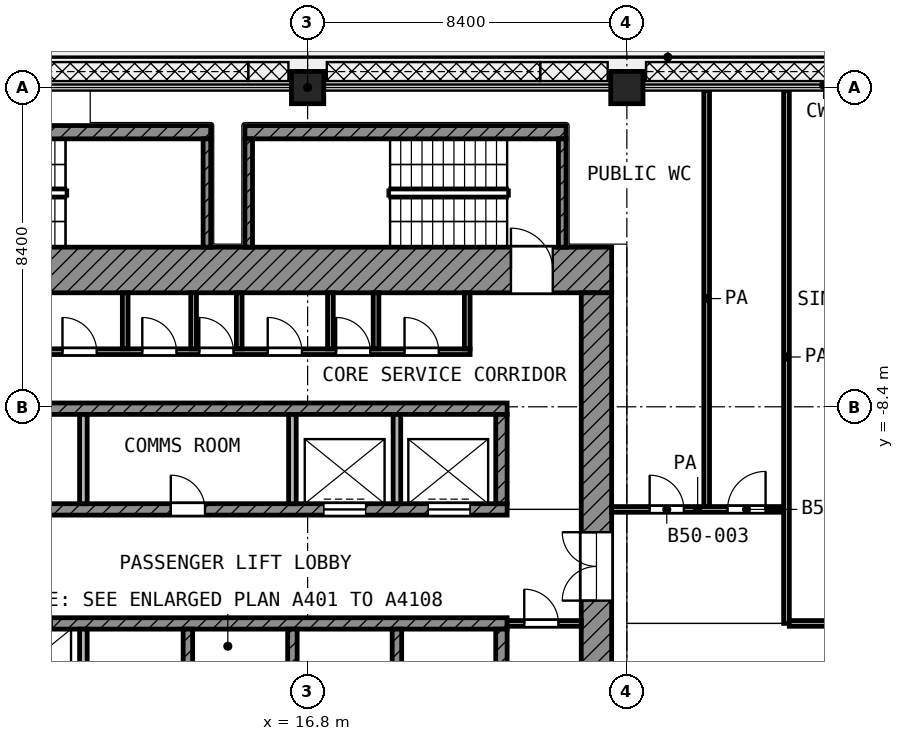
"""IFC4 building model, lengths in metres.
Left out: names, types, materials, properties, quantities, classifications, styles, units other than length and angle.
Written with IfcOpenShell. Run it as: python <this file> out.ifc"""

import sys

from ifc_helpers import new_model, si_unit, direction, frame, frame_2d, origin, origin_2d, place, context, subcontext, project, spatial, rectangle, extrude, element, fill, save


model = new_model("IFC4")
c1 = context("Model", 3, precision=1e-05, world=origin(), true_north=direction((0.0, 1.0)))
c2 = subcontext(c1, "Body", "Model", "MODEL_VIEW")
j1 = project(units=[si_unit("LENGTHUNIT", "METRE"), si_unit("PLANEANGLEUNIT", "RADIAN")], contexts=[c1])
p1 = place(None, origin())
s1 = spatial("IfcSite", under=j1, at=p1, CompositionType="ELEMENT")
p2 = place(p1, origin())
s2 = spatial("IfcBuilding", under=s1, at=p2, CompositionType="ELEMENT")
p3 = place(p2, frame((0.0, 0.0, 218.0)))
s3 = spatial("IfcBuildingStorey", under=s2, at=p3, CompositionType="ELEMENT", Elevation=218.0)
for number, where, z_axis, x_axis in (
    (1, (16.8, 0.0, 0.0), (0.0, 0.0, 1.0), (1.0, 0.0, 0.0)),
    (2, (25.2, 0.0, 0.0), (0.0, 0.0, 1.0), (1.0, 0.0, 0.0)),
):
    element("IfcColumn", number, at=place(p3, frame(where, z_axis=z_axis, x_axis=x_axis)), inside=s3, PredefinedType="COLUMN", context=c2, shape_type="SweptSolid", body=[
        extrude(rectangle(XDim=0.85, YDim=0.85, at=origin_2d()), origin(), (0.0, 0.0, 1.0), 4.2),
    ])
p4 = place(p3, frame((4.2, -4.8, 0.0), z_axis=(0.0, 0.0, 1.0), x_axis=(1.0, 0.0, 0.0)))
e3 = element("IfcWall", 3, at=p4, inside=s3, PredefinedType="SHEAR", context=c2, shape_type="SweptSolid", body=[
    extrude(rectangle(XDim=20.6, YDim=1.2, at=frame_2d((10.3, 0.0))), origin(), (0.0, 0.0, 1.0), 3.6),
])
p5 = place(p4, frame((1.95, 0.0, 0.0)))
e4 = element("IfcOpeningElement", 4, at=p5, cuts=e3, PredefinedType="OPENING", context=c2, shape_type="SweptSolid", body=[
    extrude(rectangle(XDim=1.1, YDim=2.1, at=frame_2d((0.55, 1.05))), frame((0.0, 0.61, 0.0), z_axis=(0.0, -1.0, 0.0), x_axis=(1.0, 0.0, 0.0)), (0.0, 0.0, 1.0), 1.22),
])
p6 = place(p4, frame((17.95, 0.0, 0.0)))
e5 = element("IfcOpeningElement", 5, at=p6, cuts=e3, PredefinedType="OPENING", context=c2, shape_type="SweptSolid", body=[
    extrude(rectangle(XDim=1.1, YDim=2.1, at=frame_2d((0.55, 1.05))), frame((0.0, 0.61, 0.0), z_axis=(0.0, -1.0, 0.0), x_axis=(1.0, 0.0, 0.0)), (0.0, 0.0, 1.0), 1.22),
])
p7 = place(p3, frame((24.4, -24.0, 0.0), z_axis=(0.0, 0.0, 1.0), x_axis=(0.0, 1.0, 0.0)))
e6 = element("IfcWall", 6, at=p7, inside=s3, PredefinedType="SHEAR", context=c2, shape_type="SweptSolid", body=[
    extrude(rectangle(XDim=18.6, YDim=0.8, at=frame_2d((9.3, 0.0))), origin(), (0.0, 0.0, 1.0), 3.6),
])
p8 = place(p7, frame((10.5, 0.0, 0.0)))
e7 = element("IfcOpeningElement", 7, at=p8, cuts=e6, PredefinedType="OPENING", context=c2, shape_type="SweptSolid", body=[
    extrude(rectangle(XDim=1.8, YDim=2.1, at=frame_2d((0.9, 1.05))), frame((0.0, 0.41, 0.0), z_axis=(0.0, -1.0, 0.0), x_axis=(1.0, 0.0, 0.0)), (0.0, 0.0, 1.0), 0.82),
])
p9 = place(p3, frame((5.4, -8.45, 0.0), z_axis=(0.0, 0.0, 1.0), x_axis=(1.0, 0.0, 0.0)))
e8 = element("IfcWall", 8, at=p9, inside=s3, PredefinedType="SHEAR", context=c2, shape_type="SweptSolid", body=[
    extrude(rectangle(XDim=16.65, YDim=0.3, at=frame_2d((8.325, 0.0))), origin(), (0.0, 0.0, 1.0), 3.6),
])
p10 = place(p3, frame((5.4, -11.1, 0.0), z_axis=(0.0, 0.0, 1.0), x_axis=(1.0, 0.0, 0.0)))
e9 = element("IfcWall", 9, at=p10, inside=s3, PredefinedType="SHEAR", context=c2, shape_type="SweptSolid", body=[
    extrude(rectangle(XDim=16.65, YDim=0.3, at=frame_2d((8.325, 0.0))), origin(), (0.0, 0.0, 1.0), 3.6),
])
p11 = place(p10, frame((11.825, 0.0, 0.0)))
e10 = element("IfcOpeningElement", 10, at=p11, cuts=e9, PredefinedType="OPENING", context=c2, shape_type="SweptSolid", body=[
    extrude(rectangle(XDim=1.1, YDim=2.1, at=frame_2d((0.55, 1.05))), frame((0.0, 0.16, 0.0), z_axis=(0.0, -1.0, 0.0), x_axis=(1.0, 0.0, 0.0)), (0.0, 0.0, 1.0), 0.32),
])
p12 = place(p10, frame((14.575, 0.0, 0.0)))
e11 = element("IfcOpeningElement", 11, at=p12, cuts=e9, PredefinedType="OPENING", context=c2, shape_type="SweptSolid", body=[
    extrude(rectangle(XDim=1.1, YDim=2.1, at=frame_2d((0.55, 1.05))), frame((0.0, 0.16, 0.0), z_axis=(0.0, -1.0, 0.0), x_axis=(1.0, 0.0, 0.0)), (0.0, 0.0, 1.0), 0.32),
])
p13 = place(p10, frame((2.3, 0.0, 0.0)))
e12 = element("IfcOpeningElement", 12, at=p13, cuts=e9, PredefinedType="OPENING", context=c2, shape_type="SweptSolid", body=[
    extrude(rectangle(XDim=0.9, YDim=2.1, at=frame_2d((0.45, 1.05))), frame((0.0, 0.16, 0.0), z_axis=(0.0, -1.0, 0.0), x_axis=(1.0, 0.0, 0.0)), (0.0, 0.0, 1.0), 0.32),
])
p14 = place(p10, frame((7.8, 0.0, 0.0)))
e13 = element("IfcOpeningElement", 13, at=p14, cuts=e9, PredefinedType="OPENING", context=c2, shape_type="SweptSolid", body=[
    extrude(rectangle(XDim=0.9, YDim=2.1, at=frame_2d((0.45, 1.05))), frame((0.0, 0.16, 0.0), z_axis=(0.0, -1.0, 0.0), x_axis=(1.0, 0.0, 0.0)), (0.0, 0.0, 1.0), 0.32),
])
p15 = place(p3, frame((5.4, -14.1, 0.0), z_axis=(0.0, 0.0, 1.0), x_axis=(1.0, 0.0, 0.0)))
e14 = element("IfcWall", 14, at=p15, inside=s3, PredefinedType="SHEAR", context=c2, shape_type="SweptSolid", body=[
    extrude(rectangle(XDim=16.65, YDim=0.3, at=frame_2d((8.325, 0.0))), origin(), (0.0, 0.0, 1.0), 3.6),
])
p16 = place(p15, frame((0.825, 0.0, 0.0)))
e15 = element("IfcOpeningElement", 15, at=p16, cuts=e14, PredefinedType="OPENING", context=c2, shape_type="SweptSolid", body=[
    extrude(rectangle(XDim=1.1, YDim=2.1, at=frame_2d((0.55, 1.05))), frame((0.0, 0.16, 0.0), z_axis=(0.0, -1.0, 0.0), x_axis=(1.0, 0.0, 0.0)), (0.0, 0.0, 1.0), 0.32),
])
p17 = place(p15, frame((3.575, 0.0, 0.0)))
e16 = element("IfcOpeningElement", 16, at=p17, cuts=e14, PredefinedType="OPENING", context=c2, shape_type="SweptSolid", body=[
    extrude(rectangle(XDim=1.1, YDim=2.1, at=frame_2d((0.55, 1.05))), frame((0.0, 0.16, 0.0), z_axis=(0.0, -1.0, 0.0), x_axis=(1.0, 0.0, 0.0)), (0.0, 0.0, 1.0), 0.32),
])
p18 = place(p3, frame((21.9, -10.95, 0.0), z_axis=(0.0, 0.0, 1.0), x_axis=(0.0, 1.0, 0.0)))
e17 = element("IfcWall", 17, at=p18, inside=s3, PredefinedType="SHEAR", context=c2, shape_type="SweptSolid", body=[
    extrude(rectangle(XDim=2.35, YDim=0.3, at=frame_2d((1.175, 0.0))), origin(), (0.0, 0.0, 1.0), 3.6),
])
p19 = place(p3, frame((21.9, -16.6, 0.0), z_axis=(0.0, 0.0, 1.0), x_axis=(0.0, 1.0, 0.0)))
e18 = element("IfcWall", 18, at=p19, inside=s3, PredefinedType="SHEAR", context=c2, shape_type="SweptSolid", body=[
    extrude(rectangle(XDim=2.35, YDim=0.3, at=frame_2d((1.175, 0.0))), origin(), (0.0, 0.0, 1.0), 3.6),
])
for number, where, z_axis, x_axis in (
    (19, (10.9, -10.95, 0.0), (0.0, 0.0, 1.0), (0.0, 1.0, 0.0)),
    (20, (16.4, -10.95, 0.0), (0.0, 0.0, 1.0), (0.0, 1.0, 0.0)),
    (21, (19.15, -10.95, 0.0), (0.0, 0.0, 1.0), (0.0, 1.0, 0.0)),
):
    element("IfcWall", number, at=place(p3, frame(where, z_axis=z_axis, x_axis=x_axis)), inside=s3, PredefinedType="PARTITIONING", context=c2, shape_type="SweptSolid", body=[
        extrude(rectangle(XDim=2.35, YDim=0.2, at=frame_2d((1.175, 0.0))), origin(), (0.0, 0.0, 1.0), 3.6),
    ])
p20 = place(p3, frame((10.9, -16.6, 0.0), z_axis=(0.0, 0.0, 1.0), x_axis=(0.0, 1.0, 0.0)))
e22 = element("IfcWall", 22, at=p20, inside=s3, PredefinedType="PARTITIONING", context=c2, shape_type="SweptSolid", body=[
    extrude(rectangle(XDim=2.35, YDim=0.2, at=frame_2d((1.175, 0.0))), origin(), (0.0, 0.0, 1.0), 3.6),
])
for number, where, z_axis, x_axis in (
    (23, (13.65, -16.6, 0.0), (0.0, 0.0, 1.0), (0.0, 1.0, 0.0)),
    (24, (16.4, -16.6, 0.0), (0.0, 0.0, 1.0), (0.0, 1.0, 0.0)),
    (25, (19.15, -16.6, 0.0), (0.0, 0.0, 1.0), (0.0, 1.0, 0.0)),
):
    element("IfcWall", number, at=place(p3, frame(where, z_axis=z_axis, x_axis=x_axis)), inside=s3, PredefinedType="SHEAR", context=c2, shape_type="SweptSolid", body=[
        extrude(rectangle(XDim=2.35, YDim=0.25, at=frame_2d((1.175, 0.0))), origin(), (0.0, 0.0, 1.0), 3.6),
    ])
p21 = place(p3, frame((22.05, -14.1, 0.0), z_axis=(0.0, 0.0, 1.0), x_axis=(1.0, 0.0, 0.0)))
e26 = element("IfcWall", 26, at=p21, inside=s3, PredefinedType="PARTITIONING", context=c2, shape_type="SweptSolid", body=[
    extrude(rectangle(XDim=1.95, YDim=0.15, at=frame_2d((0.975, 0.0))), origin(), (0.0, 0.0, 1.0), 3.6),
])
p22 = place(p21, frame((0.45, 0.0, 0.0)))
e27 = element("IfcOpeningElement", 27, at=p22, cuts=e26, PredefinedType="OPENING", context=c2, shape_type="SweptSolid", body=[
    extrude(rectangle(XDim=0.9, YDim=2.1, at=frame_2d((0.45, 1.05))), frame((0.0, 0.085, 0.0), z_axis=(0.0, -1.0, 0.0), x_axis=(1.0, 0.0, 0.0)), (0.0, 0.0, 1.0), 0.17),
])
p23 = place(p3, frame((8.325, -6.95, 0.0), z_axis=(0.0, 0.0, 1.0), x_axis=(1.0, 0.0, 0.0)))
e28 = element("IfcWall", 28, at=p23, inside=s3, PredefinedType="PARTITIONING", context=c2, shape_type="SweptSolid", body=[
    extrude(rectangle(XDim=12.75, YDim=0.15, at=frame_2d((6.375, 0.0))), origin(), (0.0, 0.0, 1.0), 3.6),
])
p24 = place(p23, frame((0.225, 0.0, 0.0)))
e29 = element("IfcOpeningElement", 29, at=p24, cuts=e28, PredefinedType="OPENING", context=c2, shape_type="SweptSolid", body=[
    extrude(rectangle(XDim=0.9, YDim=2.1, at=frame_2d((0.45, 1.05))), frame((0.0, 0.085, 0.0), z_axis=(0.0, -1.0, 0.0), x_axis=(1.0, 0.0, 0.0)), (0.0, 0.0, 1.0), 0.17),
])
p25 = place(p23, frame((2.025, 0.0, 0.0)))
e30 = element("IfcOpeningElement", 30, at=p25, cuts=e28, PredefinedType="OPENING", context=c2, shape_type="SweptSolid", body=[
    extrude(rectangle(XDim=0.9, YDim=2.1, at=frame_2d((0.45, 1.05))), frame((0.0, 0.085, 0.0), z_axis=(0.0, -1.0, 0.0), x_axis=(1.0, 0.0, 0.0)), (0.0, 0.0, 1.0), 0.17),
])
p26 = place(p23, frame((4.125, 0.0, 0.0)))
e31 = element("IfcOpeningElement", 31, at=p26, cuts=e28, PredefinedType="OPENING", context=c2, shape_type="SweptSolid", body=[
    extrude(rectangle(XDim=0.9, YDim=2.1, at=frame_2d((0.45, 1.05))), frame((0.0, 0.085, 0.0), z_axis=(0.0, -1.0, 0.0), x_axis=(1.0, 0.0, 0.0)), (0.0, 0.0, 1.0), 0.17),
])
p27 = place(p23, frame((5.625, 0.0, 0.0)))
e32 = element("IfcOpeningElement", 32, at=p27, cuts=e28, PredefinedType="OPENING", context=c2, shape_type="SweptSolid", body=[
    extrude(rectangle(XDim=0.9, YDim=2.1, at=frame_2d((0.45, 1.05))), frame((0.0, 0.085, 0.0), z_axis=(0.0, -1.0, 0.0), x_axis=(1.0, 0.0, 0.0)), (0.0, 0.0, 1.0), 0.17),
])
p28 = place(p23, frame((7.425, 0.0, 0.0)))
e33 = element("IfcOpeningElement", 33, at=p28, cuts=e28, PredefinedType="OPENING", context=c2, shape_type="SweptSolid", body=[
    extrude(rectangle(XDim=0.9, YDim=2.1, at=frame_2d((0.45, 1.05))), frame((0.0, 0.085, 0.0), z_axis=(0.0, -1.0, 0.0), x_axis=(1.0, 0.0, 0.0)), (0.0, 0.0, 1.0), 0.17),
])
p29 = place(p23, frame((9.225, 0.0, 0.0)))
e34 = element("IfcOpeningElement", 34, at=p29, cuts=e28, PredefinedType="OPENING", context=c2, shape_type="SweptSolid", body=[
    extrude(rectangle(XDim=0.9, YDim=2.1, at=frame_2d((0.45, 1.05))), frame((0.0, 0.085, 0.0), z_axis=(0.0, -1.0, 0.0), x_axis=(1.0, 0.0, 0.0)), (0.0, 0.0, 1.0), 0.17),
])
p30 = place(p23, frame((11.025, 0.0, 0.0)))
e35 = element("IfcOpeningElement", 35, at=p30, cuts=e28, PredefinedType="OPENING", context=c2, shape_type="SweptSolid", body=[
    extrude(rectangle(XDim=0.9, YDim=2.1, at=frame_2d((0.45, 1.05))), frame((0.0, 0.085, 0.0), z_axis=(0.0, -1.0, 0.0), x_axis=(1.0, 0.0, 0.0)), (0.0, 0.0, 1.0), 0.17),
])
for number, where, z_axis, x_axis in (
    (36, (12.0, -6.875, 0.0), (0.0, 0.0, 1.0), (0.0, 1.0, 0.0)),
    (37, (13.8, -6.875, 0.0), (0.0, 0.0, 1.0), (0.0, 1.0, 0.0)),
    (38, (15.0, -6.875, 0.0), (0.0, 0.0, 1.0), (0.0, 1.0, 0.0)),
    (39, (17.4, -6.875, 0.0), (0.0, 0.0, 1.0), (0.0, 1.0, 0.0)),
    (40, (18.6, -6.875, 0.0), (0.0, 0.0, 1.0), (0.0, 1.0, 0.0)),
    (41, (21.0, -6.875, 0.0), (0.0, 0.0, 1.0), (0.0, 1.0, 0.0)),
):
    element("IfcWall", number, at=place(p3, frame(where, z_axis=z_axis, x_axis=x_axis)), inside=s3, PredefinedType="PARTITIONING", context=c2, shape_type="SweptSolid", body=[
        extrude(rectangle(XDim=1.475, YDim=0.15, at=frame_2d((0.738, 0.0))), origin(), (0.0, 0.0, 1.0), 3.6),
    ])
p31 = place(p3, frame((5.8, -1.175, 0.0), z_axis=(0.0, 0.0, 1.0), x_axis=(1.0, 0.0, 0.0)))
e42 = element("IfcWall", 42, at=p31, inside=s3, PredefinedType="SHEAR", context=c2, shape_type="SweptSolid", body=[
    extrude(rectangle(XDim=8.45, YDim=0.35, at=frame_2d((4.225, 0.0))), origin(), (0.0, 0.0, 1.0), 3.6),
])
p32 = place(p3, frame((14.15, -4.2, 0.0), z_axis=(0.0, 0.0, 1.0), x_axis=(0.0, 1.0, 0.0)))
e43 = element("IfcWall", 43, at=p32, inside=s3, PredefinedType="SHEAR", context=c2, shape_type="SweptSolid", body=[
    extrude(rectangle(XDim=2.85, YDim=0.2, at=frame_2d((1.425, 0.0))), origin(), (0.0, 0.0, 1.0), 3.6),
])
p33 = place(p3, frame((15.15, -1.175, 0.0), z_axis=(0.0, 0.0, 1.0), x_axis=(1.0, 0.0, 0.0)))
e44 = element("IfcWall", 44, at=p33, inside=s3, PredefinedType="SHEAR", context=c2, shape_type="SweptSolid", body=[
    extrude(rectangle(XDim=8.45, YDim=0.35, at=frame_2d((4.225, 0.0))), origin(), (0.0, 0.0, 1.0), 3.6),
])
for number, where, z_axis, x_axis in (
    (45, (15.25, -4.2, 0.0), (0.0, 0.0, 1.0), (0.0, 1.0, 0.0)),
    (46, (23.5, -4.2, 0.0), (0.0, 0.0, 1.0), (0.0, 1.0, 0.0)),
):
    element("IfcWall", number, at=place(p3, frame(where, z_axis=z_axis, x_axis=x_axis)), inside=s3, PredefinedType="SHEAR", context=c2, shape_type="SweptSolid", body=[
        extrude(rectangle(XDim=2.85, YDim=0.2, at=frame_2d((1.425, 0.0))), origin(), (0.0, 0.0, 1.0), 3.6),
    ])
p34 = place(p3, frame((29.475, -14.1, 0.0), z_axis=(0.0, 0.0, 1.0), x_axis=(1.0, 0.0, 0.0)))
e47 = element("IfcWall", 47, at=p34, inside=s3, PredefinedType="PARTITIONING", context=c2, shape_type="SweptSolid", body=[
    extrude(rectangle(XDim=10.757, YDim=0.15, at=frame_2d((5.378, 0.0))), origin(), (0.0, 0.0, 1.0), 3.6),
])
p35 = place(p3, frame((24.8, -11.1, 0.0), z_axis=(0.0, 0.0, 1.0), x_axis=(1.0, 0.0, 0.0)))
e48 = element("IfcWall", 48, at=p35, inside=s3, PredefinedType="PARTITIONING", context=c2, shape_type="SweptSolid", body=[
    extrude(rectangle(XDim=4.525, YDim=0.15, at=frame_2d((2.262, 0.0))), origin(), (0.0, 0.0, 1.0), 3.6),
])
p36 = place(p35, frame((1.0, 0.0, 0.0)))
e49 = element("IfcOpeningElement", 49, at=p36, cuts=e48, PredefinedType="OPENING", context=c2, shape_type="SweptSolid", body=[
    extrude(rectangle(XDim=0.9, YDim=2.1, at=frame_2d((0.45, 1.05))), frame((0.0, 0.085, 0.0), z_axis=(0.0, -1.0, 0.0), x_axis=(1.0, 0.0, 0.0)), (0.0, 0.0, 1.0), 0.17),
])
p37 = place(p35, frame((3.05, 0.0, 0.0)))
e50 = element("IfcOpeningElement", 50, at=p37, cuts=e48, PredefinedType="OPENING", context=c2, shape_type="SweptSolid", body=[
    extrude(rectangle(XDim=1.0, YDim=2.1, at=frame_2d((0.5, 1.05))), frame((0.0, 0.085, 0.0), z_axis=(0.0, -1.0, 0.0), x_axis=(1.0, 0.0, 0.0)), (0.0, 0.0, 1.0), 0.17),
])
p38 = place(p3, frame((27.3, -11.025, 0.0), z_axis=(0.0, 0.0, 1.0), x_axis=(0.0, 1.0, 0.0)))
e51 = element("IfcWall", 51, at=p38, inside=s3, PredefinedType="PARTITIONING", context=c2, shape_type="SweptSolid", body=[
    extrude(rectangle(XDim=10.945, YDim=0.15, at=frame_2d((5.472, 0.0))), origin(), (0.0, 0.0, 1.0), 3.6),
])
p39 = place(p3, frame((29.4, -14.1, 0.0), z_axis=(0.0, 0.0, 1.0), x_axis=(0.0, 1.0, 0.0)))
e52 = element("IfcWall", 52, at=p39, inside=s3, PredefinedType="PARTITIONING", context=c2, shape_type="SweptSolid", body=[
    extrude(rectangle(XDim=14.02, YDim=0.15, at=frame_2d((7.01, 0.0))), origin(), (0.0, 0.0, 1.0), 3.6),
])
p40 = place(p11, origin())
e53 = element("IfcDoor", 53, at=p40, inside=s3, OperationType="DOUBLE_DOOR_SLIDING", PredefinedType="DOOR", context=c2, shape_type="SweptSolid", body=[
    extrude(rectangle(XDim=1.1, YDim=2.1, at=frame_2d((0.55, 1.05))), frame((0.0, 0.025, 0.0), z_axis=(0.0, -1.0, 0.0), x_axis=(1.0, 0.0, 0.0)), (0.0, 0.0, 1.0), 0.05),
])
fill(e10, e53)
p41 = place(p12, origin())
e54 = element("IfcDoor", 54, at=p41, inside=s3, OperationType="DOUBLE_DOOR_SLIDING", PredefinedType="DOOR", context=c2, shape_type="SweptSolid", body=[
    extrude(rectangle(XDim=1.1, YDim=2.1, at=frame_2d((0.55, 1.05))), frame((0.0, 0.025, 0.0), z_axis=(0.0, -1.0, 0.0), x_axis=(1.0, 0.0, 0.0)), (0.0, 0.0, 1.0), 0.05),
])
fill(e11, e54)
p42 = place(p6, origin())
e55 = element("IfcDoor", 55, at=p42, inside=s3, OperationType="SINGLE_SWING_LEFT", PredefinedType="DOOR", context=c2, shape_type="SweptSolid", body=[
    extrude(rectangle(XDim=1.1, YDim=2.1, at=frame_2d((0.55, 1.05))), frame((0.0, 0.025, 0.0), z_axis=(0.0, -1.0, 0.0), x_axis=(1.0, 0.0, 0.0)), (0.0, 0.0, 1.0), 0.05),
])
fill(e5, e55)
p43 = place(p8, origin())
e56 = element("IfcDoor", 56, at=p43, inside=s3, OperationType="DOUBLE_DOOR_SINGLE_SWING", PredefinedType="DOOR", context=c2, shape_type="SweptSolid", body=[
    extrude(rectangle(XDim=1.8, YDim=2.1, at=frame_2d((0.9, 1.05))), frame((0.0, 0.025, 0.0), z_axis=(0.0, -1.0, 0.0), x_axis=(1.0, 0.0, 0.0)), (0.0, 0.0, 1.0), 0.05),
])
fill(e7, e56)
p44 = place(p25, origin())
e57 = element("IfcDoor", 57, at=p44, inside=s3, OperationType="SINGLE_SWING_LEFT", PredefinedType="DOOR", context=c2, shape_type="SweptSolid", body=[
    extrude(rectangle(XDim=0.9, YDim=2.1, at=frame_2d((0.45, 1.05))), frame((0.0, 0.025, 0.0), z_axis=(0.0, -1.0, 0.0), x_axis=(1.0, 0.0, 0.0)), (0.0, 0.0, 1.0), 0.05),
])
fill(e30, e57)
p45 = place(p26, origin())
e58 = element("IfcDoor", 58, at=p45, inside=s3, OperationType="SINGLE_SWING_LEFT", PredefinedType="DOOR", context=c2, shape_type="SweptSolid", body=[
    extrude(rectangle(XDim=0.9, YDim=2.1, at=frame_2d((0.45, 1.05))), frame((0.0, 0.025, 0.0), z_axis=(0.0, -1.0, 0.0), x_axis=(1.0, 0.0, 0.0)), (0.0, 0.0, 1.0), 0.05),
])
fill(e31, e58)
p46 = place(p27, origin())
e59 = element("IfcDoor", 59, at=p46, inside=s3, OperationType="SINGLE_SWING_LEFT", PredefinedType="DOOR", context=c2, shape_type="SweptSolid", body=[
    extrude(rectangle(XDim=0.9, YDim=2.1, at=frame_2d((0.45, 1.05))), frame((0.0, 0.025, 0.0), z_axis=(0.0, -1.0, 0.0), x_axis=(1.0, 0.0, 0.0)), (0.0, 0.0, 1.0), 0.05),
])
fill(e32, e59)
p47 = place(p28, origin())
e60 = element("IfcDoor", 60, at=p47, inside=s3, OperationType="SINGLE_SWING_LEFT", PredefinedType="DOOR", context=c2, shape_type="SweptSolid", body=[
    extrude(rectangle(XDim=0.9, YDim=2.1, at=frame_2d((0.45, 1.05))), frame((0.0, 0.025, 0.0), z_axis=(0.0, -1.0, 0.0), x_axis=(1.0, 0.0, 0.0)), (0.0, 0.0, 1.0), 0.05),
])
fill(e33, e60)
p48 = place(p29, origin())
e61 = element("IfcDoor", 61, at=p48, inside=s3, OperationType="SINGLE_SWING_LEFT", PredefinedType="DOOR", context=c2, shape_type="SweptSolid", body=[
    extrude(rectangle(XDim=0.9, YDim=2.1, at=frame_2d((0.45, 1.05))), frame((0.0, 0.025, 0.0), z_axis=(0.0, -1.0, 0.0), x_axis=(1.0, 0.0, 0.0)), (0.0, 0.0, 1.0), 0.05),
])
fill(e34, e61)
p49 = place(p30, origin())
e62 = element("IfcDoor", 62, at=p49, inside=s3, OperationType="SINGLE_SWING_LEFT", PredefinedType="DOOR", context=c2, shape_type="SweptSolid", body=[
    extrude(rectangle(XDim=0.9, YDim=2.1, at=frame_2d((0.45, 1.05))), frame((0.0, 0.025, 0.0), z_axis=(0.0, -1.0, 0.0), x_axis=(1.0, 0.0, 0.0)), (0.0, 0.0, 1.0), 0.05),
])
fill(e35, e62)
p50 = place(p22, origin())
e63 = element("IfcDoor", 63, at=p50, inside=s3, OperationType="SINGLE_SWING_LEFT", PredefinedType="DOOR", context=c2, shape_type="SweptSolid", body=[
    extrude(rectangle(XDim=0.9, YDim=2.1, at=frame_2d((0.45, 1.05))), frame((0.0, 0.025, 0.0), z_axis=(0.0, -1.0, 0.0), x_axis=(1.0, 0.0, 0.0)), (0.0, 0.0, 1.0), 0.05),
])
fill(e27, e63)
p51 = place(p14, origin())
e64 = element("IfcDoor", 64, at=p51, inside=s3, OperationType="SINGLE_SWING_LEFT", PredefinedType="DOOR", context=c2, shape_type="SweptSolid", body=[
    extrude(rectangle(XDim=0.9, YDim=2.1, at=frame_2d((0.45, 1.05))), frame((0.0, 0.025, 0.0), z_axis=(0.0, -1.0, 0.0), x_axis=(1.0, 0.0, 0.0)), (0.0, 0.0, 1.0), 0.05),
])
fill(e13, e64)
p52 = place(p36, origin())
e65 = element("IfcDoor", 65, at=p52, inside=s3, OperationType="SINGLE_SWING_LEFT", PredefinedType="DOOR", context=c2, shape_type="SweptSolid", body=[
    extrude(rectangle(XDim=0.9, YDim=2.1, at=frame_2d((0.45, 1.05))), frame((0.0, 0.025, 0.0), z_axis=(0.0, -1.0, 0.0), x_axis=(1.0, 0.0, 0.0)), (0.0, 0.0, 1.0), 0.05),
])
fill(e49, e65)
p53 = place(p37, origin())
e66 = element("IfcDoor", 66, at=p53, inside=s3, OperationType="SINGLE_SWING_RIGHT", PredefinedType="DOOR", context=c2, shape_type="SweptSolid", body=[
    extrude(rectangle(XDim=1.0, YDim=2.1, at=frame_2d((0.5, 1.05))), frame((0.0, 0.025, 0.0), z_axis=(0.0, -1.0, 0.0), x_axis=(1.0, 0.0, 0.0)), (0.0, 0.0, 1.0), 0.05),
])
fill(e50, e66)
save(model, sys.argv[1])
